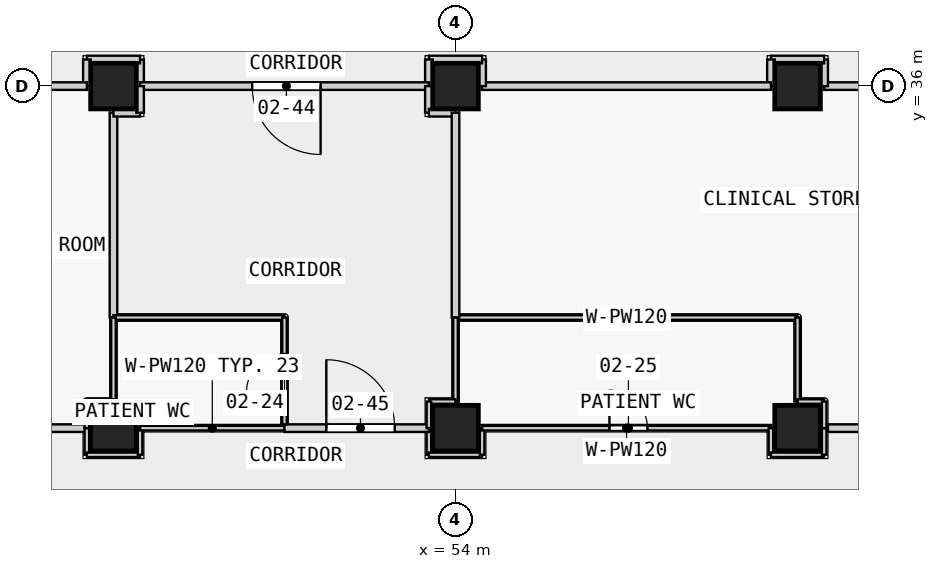
"""IFC4 building model, lengths in metres.
Left out: names, types, materials, properties, quantities, classifications, styles, units other than length and angle.
Written with IfcOpenShell. Run it as: python <this file> out.ifc"""

import sys

from ifc_helpers import new_model, si_unit, direction, frame, frame_2d, origin, origin_2d, place, context, subcontext, project, spatial, rectangle, extrude, element, fill, save


model = new_model("IFC4")
c1 = context("Model", 3, precision=1e-05, world=origin(), true_north=direction((0.0, 1.0)))
c2 = subcontext(c1, "Body", "Model", "MODEL_VIEW")
j1 = project(units=[si_unit("LENGTHUNIT", "METRE"), si_unit("PLANEANGLEUNIT", "RADIAN")], contexts=[c1])
p1 = place(None, origin())
s1 = spatial("IfcSite", under=j1, at=p1, CompositionType="ELEMENT")
p2 = place(p1, origin())
s2 = spatial("IfcBuilding", under=s1, at=p2, CompositionType="ELEMENT")
p3 = place(p2, frame((0.0, 0.0, 12.8)))
s3 = spatial("IfcBuildingStorey", under=s2, at=p3, CompositionType="ELEMENT", Elevation=12.8)
for number, where, z_axis, x_axis in (
    (1, (45.0, 27.0, 0.0), (0.0, 0.0, 1.0), (1.0, 0.0, 0.0)),
    (2, (45.0, 36.0, 0.0), (0.0, 0.0, 1.0), (1.0, 0.0, 0.0)),
    (3, (54.0, 27.0, 0.0), (0.0, 0.0, 1.0), (1.0, 0.0, 0.0)),
    (4, (54.0, 36.0, 0.0), (0.0, 0.0, 1.0), (1.0, 0.0, 0.0)),
    (5, (63.0, 27.0, 0.0), (0.0, 0.0, 1.0), (1.0, 0.0, 0.0)),
    (6, (63.0, 36.0, 0.0), (0.0, 0.0, 1.0), (1.0, 0.0, 0.0)),
):
    element("IfcColumn", number, at=place(p3, frame(where, z_axis=z_axis, x_axis=x_axis)), inside=s3, PredefinedType="COLUMN", context=c2, shape_type="SweptSolid", body=[
        extrude(rectangle(XDim=1.2, YDim=1.2, at=origin_2d()), origin(), (0.0, 0.0, 1.0), 4.5),
    ])
p4 = place(p3, frame((71.3, 36.0, 0.0), z_axis=(0.0, 0.0, 1.0), x_axis=(-1.0, 0.0, 0.0)))
e7 = element("IfcWall", 7, at=p4, inside=s3, PredefinedType="PARTITIONING", context=c2, shape_type="SweptSolid", body=[
    extrude(rectangle(XDim=7.6, YDim=0.2, at=frame_2d((3.8, 0.0))), origin(), (0.0, 0.0, 1.0), 3.45),
])
p5 = place(p4, frame((3.35, 0.0, 0.0)))
e8 = element("IfcOpeningElement", 8, at=p5, cuts=e7, PredefinedType="OPENING", context=c2, shape_type="SweptSolid", body=[
    extrude(rectangle(XDim=0.9, YDim=2.1, at=frame_2d((0.45, 1.05))), frame((0.0, 0.11, 0.0), z_axis=(0.0, -1.0, 0.0), x_axis=(1.0, 0.0, 0.0)), (0.0, 0.0, 1.0), 0.22),
])
p6 = place(p3, frame((63.7, 36.0, 0.0), z_axis=(0.0, 0.0, 1.0), x_axis=(0.0, 1.0, 0.0)))
e9 = element("IfcWall", 9, at=p6, inside=s3, PredefinedType="PARTITIONING", context=c2, shape_type="SweptSolid", body=[
    extrude(rectangle(XDim=0.7, YDim=0.2, at=frame_2d((0.35, 0.0))), origin(), (0.0, 0.0, 1.0), 3.45),
])
p7 = place(p3, frame((63.7, 36.7, 0.0), z_axis=(0.0, 0.0, 1.0), x_axis=(-1.0, 0.0, 0.0)))
e10 = element("IfcWall", 10, at=p7, inside=s3, PredefinedType="PARTITIONING", context=c2, shape_type="SweptSolid", body=[
    extrude(rectangle(XDim=1.4, YDim=0.2, at=frame_2d((0.7, 0.0))), origin(), (0.0, 0.0, 1.0), 3.45),
])
p8 = place(p3, frame((62.3, 36.7, 0.0), z_axis=(0.0, 0.0, 1.0), x_axis=(0.0, -1.0, 0.0)))
e11 = element("IfcWall", 11, at=p8, inside=s3, PredefinedType="PARTITIONING", context=c2, shape_type="SweptSolid", body=[
    extrude(rectangle(XDim=0.7, YDim=0.2, at=frame_2d((0.35, 0.0))), origin(), (0.0, 0.0, 1.0), 3.45),
])
p9 = place(p3, frame((62.3, 36.0, 0.0), z_axis=(0.0, 0.0, 1.0), x_axis=(-1.0, 0.0, 0.0)))
e12 = element("IfcWall", 12, at=p9, inside=s3, PredefinedType="PARTITIONING", context=c2, shape_type="SweptSolid", body=[
    extrude(rectangle(XDim=7.6, YDim=0.2, at=frame_2d((3.8, 0.0))), origin(), (0.0, 0.0, 1.0), 3.45),
])
p10 = place(p3, frame((54.7, 36.0, 0.0), z_axis=(0.0, 0.0, 1.0), x_axis=(0.0, 1.0, 0.0)))
e13 = element("IfcWall", 13, at=p10, inside=s3, PredefinedType="PARTITIONING", context=c2, shape_type="SweptSolid", body=[
    extrude(rectangle(XDim=0.7, YDim=0.2, at=frame_2d((0.35, 0.0))), origin(), (0.0, 0.0, 1.0), 3.45),
])
p11 = place(p3, frame((54.7, 36.7, 0.0), z_axis=(0.0, 0.0, 1.0), x_axis=(-1.0, 0.0, 0.0)))
e14 = element("IfcWall", 14, at=p11, inside=s3, PredefinedType="PARTITIONING", context=c2, shape_type="SweptSolid", body=[
    extrude(rectangle(XDim=1.4, YDim=0.2, at=frame_2d((0.7, 0.0))), origin(), (0.0, 0.0, 1.0), 3.45),
])
p12 = place(p3, frame((53.3, 36.7, 0.0), z_axis=(0.0, 0.0, 1.0), x_axis=(0.0, -1.0, 0.0)))
e15 = element("IfcWall", 15, at=p12, inside=s3, PredefinedType="PARTITIONING", context=c2, shape_type="SweptSolid", body=[
    extrude(rectangle(XDim=0.7, YDim=0.2, at=frame_2d((0.35, 0.0))), origin(), (0.0, 0.0, 1.0), 3.45),
])
p13 = place(p3, frame((53.3, 27.0, 0.0), z_axis=(0.0, 0.0, 1.0), x_axis=(0.0, -1.0, 0.0)))
e16 = element("IfcWall", 16, at=p13, inside=s3, PredefinedType="PARTITIONING", context=c2, shape_type="SweptSolid", body=[
    extrude(rectangle(XDim=0.7, YDim=0.12, at=frame_2d((0.35, 0.0))), origin(), (0.0, 0.0, 1.0), 3.45),
])
p14 = place(p3, frame((53.3, 26.3, 0.0), z_axis=(0.0, 0.0, 1.0), x_axis=(1.0, 0.0, 0.0)))
e17 = element("IfcWall", 17, at=p14, inside=s3, PredefinedType="PARTITIONING", context=c2, shape_type="SweptSolid", body=[
    extrude(rectangle(XDim=1.4, YDim=0.12, at=frame_2d((0.7, 0.0))), origin(), (0.0, 0.0, 1.0), 3.45),
])
p15 = place(p3, frame((54.7, 26.3, 0.0), z_axis=(0.0, 0.0, 1.0), x_axis=(0.0, 1.0, 0.0)))
e18 = element("IfcWall", 18, at=p15, inside=s3, PredefinedType="PARTITIONING", context=c2, shape_type="SweptSolid", body=[
    extrude(rectangle(XDim=0.7, YDim=0.12, at=frame_2d((0.35, 0.0))), origin(), (0.0, 0.0, 1.0), 3.45),
])
p16 = place(p3, frame((54.7, 27.0, 0.0), z_axis=(0.0, 0.0, 1.0), x_axis=(1.0, 0.0, 0.0)))
e19 = element("IfcWall", 19, at=p16, inside=s3, PredefinedType="PARTITIONING", context=c2, shape_type="SweptSolid", body=[
    extrude(rectangle(XDim=7.6, YDim=0.12, at=frame_2d((3.8, 0.0))), origin(), (0.0, 0.0, 1.0), 3.45),
])
p17 = place(p16, frame((3.35, 0.0, 0.0)))
e20 = element("IfcOpeningElement", 20, at=p17, cuts=e19, PredefinedType="OPENING", context=c2, shape_type="SweptSolid", body=[
    extrude(rectangle(XDim=1.0, YDim=2.1, at=frame_2d((0.5, 1.05))), frame((0.0, 0.07, 0.0), z_axis=(0.0, -1.0, 0.0), x_axis=(1.0, 0.0, 0.0)), (0.0, 0.0, 1.0), 0.14),
])
p18 = place(p3, frame((62.3, 27.0, 0.0), z_axis=(0.0, 0.0, 1.0), x_axis=(0.0, -1.0, 0.0)))
e21 = element("IfcWall", 21, at=p18, inside=s3, PredefinedType="PARTITIONING", context=c2, shape_type="SweptSolid", body=[
    extrude(rectangle(XDim=0.7, YDim=0.12, at=frame_2d((0.35, 0.0))), origin(), (0.0, 0.0, 1.0), 3.45),
])
p19 = place(p3, frame((62.3, 26.3, 0.0), z_axis=(0.0, 0.0, 1.0), x_axis=(1.0, 0.0, 0.0)))
e22 = element("IfcWall", 22, at=p19, inside=s3, PredefinedType="PARTITIONING", context=c2, shape_type="SweptSolid", body=[
    extrude(rectangle(XDim=1.4, YDim=0.12, at=frame_2d((0.7, 0.0))), origin(), (0.0, 0.0, 1.0), 3.45),
])
p20 = place(p3, frame((63.7, 26.3, 0.0), z_axis=(0.0, 0.0, 1.0), x_axis=(0.0, 1.0, 0.0)))
e23 = element("IfcWall", 23, at=p20, inside=s3, PredefinedType="PARTITIONING", context=c2, shape_type="SweptSolid", body=[
    extrude(rectangle(XDim=0.7, YDim=0.12, at=frame_2d((0.35, 0.0))), origin(), (0.0, 0.0, 1.0), 3.45),
])
p21 = place(p3, frame((54.0, 29.911, 0.0), z_axis=(0.0, 0.0, 1.0), x_axis=(1.0, 0.0, 0.0)))
e24 = element("IfcWall", 24, at=p21, inside=s3, PredefinedType="PARTITIONING", context=c2, shape_type="SweptSolid", body=[
    extrude(rectangle(XDim=9.0, YDim=0.12, at=frame_2d((4.5, 0.0))), origin(), (0.0, 0.0, 1.0), 3.45),
])
p22 = place(p3, frame((63.0, 29.911, 0.0), z_axis=(0.0, 0.0, 1.0), x_axis=(0.0, -1.0, 0.0)))
e25 = element("IfcWall", 25, at=p22, inside=s3, PredefinedType="PARTITIONING", context=c2, shape_type="SweptSolid", body=[
    extrude(rectangle(XDim=2.211, YDim=0.12, at=frame_2d((1.105, 0.0))), origin(), (0.0, 0.0, 1.0), 3.45),
])
for number, where, z_axis, x_axis in (
    (26, (63.0, 27.7, 0.0), (0.0, 0.0, 1.0), (1.0, 0.0, 0.0)),
    (27, (63.7, 27.7, 0.0), (0.0, 0.0, 1.0), (0.0, -1.0, 0.0)),
):
    element("IfcWall", number, at=place(p3, frame(where, z_axis=z_axis, x_axis=x_axis)), inside=s3, PredefinedType="PARTITIONING", context=c2, shape_type="SweptSolid", body=[
        extrude(rectangle(XDim=0.7, YDim=0.12, at=frame_2d((0.35, 0.0))), origin(), (0.0, 0.0, 1.0), 3.45),
    ])
p23 = place(p3, frame((45.7, 36.0, 0.0), z_axis=(0.0, 0.0, 1.0), x_axis=(0.0, 1.0, 0.0)))
e28 = element("IfcWall", 28, at=p23, inside=s3, PredefinedType="PARTITIONING", context=c2, shape_type="SweptSolid", body=[
    extrude(rectangle(XDim=0.7, YDim=0.2, at=frame_2d((0.35, 0.0))), origin(), (0.0, 0.0, 1.0), 3.45),
])
p24 = place(p3, frame((45.7, 36.7, 0.0), z_axis=(0.0, 0.0, 1.0), x_axis=(-1.0, 0.0, 0.0)))
e29 = element("IfcWall", 29, at=p24, inside=s3, PredefinedType="PARTITIONING", context=c2, shape_type="SweptSolid", body=[
    extrude(rectangle(XDim=1.4, YDim=0.2, at=frame_2d((0.7, 0.0))), origin(), (0.0, 0.0, 1.0), 3.45),
])
p25 = place(p3, frame((44.3, 36.7, 0.0), z_axis=(0.0, 0.0, 1.0), x_axis=(0.0, -1.0, 0.0)))
e30 = element("IfcWall", 30, at=p25, inside=s3, PredefinedType="PARTITIONING", context=c2, shape_type="SweptSolid", body=[
    extrude(rectangle(XDim=0.7, YDim=0.2, at=frame_2d((0.35, 0.0))), origin(), (0.0, 0.0, 1.0), 3.45),
])
p26 = place(p3, frame((44.3, 36.0, 0.0), z_axis=(0.0, 0.0, 1.0), x_axis=(-1.0, 0.0, 0.0)))
e31 = element("IfcWall", 31, at=p26, inside=s3, PredefinedType="PARTITIONING", context=c2, shape_type="SweptSolid", body=[
    extrude(rectangle(XDim=7.6, YDim=0.2, at=frame_2d((3.8, 0.0))), origin(), (0.0, 0.0, 1.0), 3.45),
])
p27 = place(p26, frame((3.1, 0.0, 0.0)))
e32 = element("IfcOpeningElement", 32, at=p27, cuts=e31, PredefinedType="OPENING", context=c2, shape_type="SweptSolid", body=[
    extrude(rectangle(XDim=1.4, YDim=2.1, at=frame_2d((0.7, 1.05))), frame((0.0, 0.11, 0.0), z_axis=(0.0, -1.0, 0.0), x_axis=(1.0, 0.0, 0.0)), (0.0, 0.0, 1.0), 0.22),
])
p28 = place(p3, frame((53.3, 36.0, 0.0), z_axis=(0.0, 0.0, 1.0), x_axis=(-1.0, 0.0, 0.0)))
e33 = element("IfcWall", 33, at=p28, inside=s3, PredefinedType="PARTITIONING", context=c2, shape_type="SweptSolid", body=[
    extrude(rectangle(XDim=7.6, YDim=0.2, at=frame_2d((3.8, 0.0))), origin(), (0.0, 0.0, 1.0), 3.45),
])
p29 = place(p28, frame((2.85, 0.0, 0.0)))
e34 = element("IfcOpeningElement", 34, at=p29, cuts=e33, PredefinedType="OPENING", context=c2, shape_type="SweptSolid", body=[
    extrude(rectangle(XDim=1.8, YDim=2.1, at=frame_2d((0.9, 1.05))), frame((0.0, 0.11, 0.0), z_axis=(0.0, -1.0, 0.0), x_axis=(1.0, 0.0, 0.0)), (0.0, 0.0, 1.0), 0.22),
])
p30 = place(p3, frame((63.8, 27.0, 0.0), z_axis=(0.0, 0.0, 1.0), x_axis=(1.0, 0.0, 0.0)))
e35 = element("IfcWall", 35, at=p30, inside=s3, PredefinedType="PARTITIONING", context=c2, shape_type="SweptSolid", body=[
    extrude(rectangle(XDim=7.4, YDim=0.2, at=frame_2d((3.7, 0.0))), origin(), (0.0, 0.0, 1.0), 3.45),
])
p31 = place(p3, frame((36.7, 27.0, 0.0), z_axis=(0.0, 0.0, 1.0), x_axis=(1.0, 0.0, 0.0)))
e36 = element("IfcWall", 36, at=p31, inside=s3, PredefinedType="PARTITIONING", context=c2, shape_type="SweptSolid", body=[
    extrude(rectangle(XDim=7.6, YDim=0.2, at=frame_2d((3.8, 0.0))), origin(), (0.0, 0.0, 1.0), 3.45),
])
p32 = place(p3, frame((45.0, 29.911, 0.0), z_axis=(0.0, 0.0, 1.0), x_axis=(0.0, 1.0, 0.0)))
e37 = element("IfcWall", 37, at=p32, inside=s3, PredefinedType="PARTITIONING", context=c2, shape_type="SweptSolid", body=[
    extrude(rectangle(XDim=5.389, YDim=0.2, at=frame_2d((2.695, 0.0))), origin(), (0.0, 0.0, 1.0), 3.45),
])
for number, where, z_axis, x_axis in (
    (38, (45.0, 35.3, 0.0), (0.0, 0.0, 1.0), (1.0, 0.0, 0.0)),
    (39, (45.7, 35.3, 0.0), (0.0, 0.0, 1.0), (0.0, 1.0, 0.0)),
    (40, (53.3, 36.0, 0.0), (0.0, 0.0, 1.0), (0.0, -1.0, 0.0)),
    (41, (53.3, 35.3, 0.0), (0.0, 0.0, 1.0), (1.0, 0.0, 0.0)),
):
    element("IfcWall", number, at=place(p3, frame(where, z_axis=z_axis, x_axis=x_axis)), inside=s3, PredefinedType="PARTITIONING", context=c2, shape_type="SweptSolid", body=[
        extrude(rectangle(XDim=0.7, YDim=0.2, at=frame_2d((0.35, 0.0))), origin(), (0.0, 0.0, 1.0), 3.45),
    ])
p33 = place(p3, frame((54.0, 35.3, 0.0), z_axis=(0.0, 0.0, 1.0), x_axis=(0.0, -1.0, 0.0)))
e42 = element("IfcWall", 42, at=p33, inside=s3, PredefinedType="PARTITIONING", context=c2, shape_type="SweptSolid", body=[
    extrude(rectangle(XDim=5.389, YDim=0.2, at=frame_2d((2.695, 0.0))), origin(), (0.0, 0.0, 1.0), 3.45),
])
p34 = place(p3, frame((44.3, 27.0, 0.0), z_axis=(0.0, 0.0, 1.0), x_axis=(0.0, -1.0, 0.0)))
e43 = element("IfcWall", 43, at=p34, inside=s3, PredefinedType="PARTITIONING", context=c2, shape_type="SweptSolid", body=[
    extrude(rectangle(XDim=0.7, YDim=0.12, at=frame_2d((0.35, 0.0))), origin(), (0.0, 0.0, 1.0), 3.45),
])
p35 = place(p3, frame((44.3, 26.3, 0.0), z_axis=(0.0, 0.0, 1.0), x_axis=(1.0, 0.0, 0.0)))
e44 = element("IfcWall", 44, at=p35, inside=s3, PredefinedType="PARTITIONING", context=c2, shape_type="SweptSolid", body=[
    extrude(rectangle(XDim=1.4, YDim=0.12, at=frame_2d((0.7, 0.0))), origin(), (0.0, 0.0, 1.0), 3.45),
])
p36 = place(p3, frame((45.7, 26.3, 0.0), z_axis=(0.0, 0.0, 1.0), x_axis=(0.0, 1.0, 0.0)))
e45 = element("IfcWall", 45, at=p36, inside=s3, PredefinedType="PARTITIONING", context=c2, shape_type="SweptSolid", body=[
    extrude(rectangle(XDim=0.7, YDim=0.12, at=frame_2d((0.35, 0.0))), origin(), (0.0, 0.0, 1.0), 3.45),
])
p37 = place(p3, frame((45.7, 27.0, 0.0), z_axis=(0.0, 0.0, 1.0), x_axis=(1.0, 0.0, 0.0)))
e46 = element("IfcWall", 46, at=p37, inside=s3, PredefinedType="PARTITIONING", context=c2, shape_type="SweptSolid", body=[
    extrude(rectangle(XDim=3.8, YDim=0.12, at=frame_2d((1.9, 0.0))), origin(), (0.0, 0.0, 1.0), 3.45),
])
p38 = place(p3, frame((49.5, 29.911, 0.0), z_axis=(0.0, 0.0, 1.0), x_axis=(-1.0, 0.0, 0.0)))
e47 = element("IfcWall", 47, at=p38, inside=s3, PredefinedType="PARTITIONING", context=c2, shape_type="SweptSolid", body=[
    extrude(rectangle(XDim=4.5, YDim=0.12, at=frame_2d((2.25, 0.0))), origin(), (0.0, 0.0, 1.0), 3.45),
])
p39 = place(p3, frame((49.5, 27.0, 0.0), z_axis=(0.0, 0.0, 1.0), x_axis=(1.0, 0.0, 0.0)))
e48 = element("IfcWall", 48, at=p39, inside=s3, PredefinedType="PARTITIONING", context=c2, shape_type="SweptSolid", body=[
    extrude(rectangle(XDim=3.8, YDim=0.2, at=frame_2d((1.9, 0.0))), origin(), (0.0, 0.0, 1.0), 3.45),
])
p40 = place(p39, frame((1.1, 0.0, 0.0)))
e49 = element("IfcOpeningElement", 49, at=p40, cuts=e48, PredefinedType="OPENING", context=c2, shape_type="SweptSolid", body=[
    extrude(rectangle(XDim=1.8, YDim=2.1, at=frame_2d((0.9, 1.05))), frame((0.0, 0.11, 0.0), z_axis=(0.0, -1.0, 0.0), x_axis=(1.0, 0.0, 0.0)), (0.0, 0.0, 1.0), 0.22),
])
p41 = place(p3, frame((54.0, 29.911, 0.0), z_axis=(0.0, 0.0, 1.0), x_axis=(0.0, -1.0, 0.0)))
e50 = element("IfcWall", 50, at=p41, inside=s3, PredefinedType="PARTITIONING", context=c2, shape_type="SweptSolid", body=[
    extrude(rectangle(XDim=2.211, YDim=0.12, at=frame_2d((1.105, 0.0))), origin(), (0.0, 0.0, 1.0), 3.45),
])
for number, where, z_axis, x_axis in (
    (51, (54.0, 27.7, 0.0), (0.0, 0.0, 1.0), (-1.0, 0.0, 0.0)),
    (52, (53.3, 27.7, 0.0), (0.0, 0.0, 1.0), (0.0, -1.0, 0.0)),
):
    element("IfcWall", number, at=place(p3, frame(where, z_axis=z_axis, x_axis=x_axis)), inside=s3, PredefinedType="PARTITIONING", context=c2, shape_type="SweptSolid", body=[
        extrude(rectangle(XDim=0.7, YDim=0.12, at=frame_2d((0.35, 0.0))), origin(), (0.0, 0.0, 1.0), 3.45),
    ])
p42 = place(p3, frame((45.0, 29.911, 0.0), z_axis=(0.0, 0.0, 1.0), x_axis=(0.0, -1.0, 0.0)))
e53 = element("IfcWall", 53, at=p42, inside=s3, PredefinedType="PARTITIONING", context=c2, shape_type="SweptSolid", body=[
    extrude(rectangle(XDim=2.211, YDim=0.12, at=frame_2d((1.105, 0.0))), origin(), (0.0, 0.0, 1.0), 3.45),
])
for number, where, z_axis, x_axis in (
    (54, (45.0, 27.7, 0.0), (0.0, 0.0, 1.0), (-1.0, 0.0, 0.0)),
    (55, (44.3, 27.7, 0.0), (0.0, 0.0, 1.0), (0.0, -1.0, 0.0)),
):
    element("IfcWall", number, at=place(p3, frame(where, z_axis=z_axis, x_axis=x_axis)), inside=s3, PredefinedType="PARTITIONING", context=c2, shape_type="SweptSolid", body=[
        extrude(rectangle(XDim=0.7, YDim=0.12, at=frame_2d((0.35, 0.0))), origin(), (0.0, 0.0, 1.0), 3.45),
    ])
p43 = place(p3, frame((49.5, 27.1, 0.0), z_axis=(0.0, 0.0, 1.0), x_axis=(0.0, 1.0, 0.0)))
e56 = element("IfcWall", 56, at=p43, inside=s3, PredefinedType="PARTITIONING", context=c2, shape_type="SweptSolid", body=[
    extrude(rectangle(XDim=2.811, YDim=0.12, at=frame_2d((1.405, 0.0))), origin(), (0.0, 0.0, 1.0), 3.45),
])
p44 = place(p43, frame((0.85, 0.0, 0.0)))
e57 = element("IfcOpeningElement", 57, at=p44, cuts=e56, PredefinedType="OPENING", context=c2, shape_type="SweptSolid", body=[
    extrude(rectangle(XDim=1.0, YDim=2.1, at=frame_2d((0.5, 1.05))), frame((0.0, 0.07, 0.0), z_axis=(0.0, -1.0, 0.0), x_axis=(1.0, 0.0, 0.0)), (0.0, 0.0, 1.0), 0.14),
])
p45 = place(p44, origin())
e58 = element("IfcDoor", 58, at=p45, inside=s3, OperationType="SINGLE_SWING_LEFT", PredefinedType="DOOR", context=c2, shape_type="SweptSolid", body=[
    extrude(rectangle(XDim=1.0, YDim=2.1, at=frame_2d((0.5, 1.05))), frame((0.0, 0.025, 0.0), z_axis=(0.0, -1.0, 0.0), x_axis=(1.0, 0.0, 0.0)), (0.0, 0.0, 1.0), 0.05),
])
fill(e57, e58)
p46 = place(p17, origin())
e59 = element("IfcDoor", 59, at=p46, inside=s3, OperationType="SINGLE_SWING_LEFT", PredefinedType="DOOR", context=c2, shape_type="SweptSolid", body=[
    extrude(rectangle(XDim=1.0, YDim=2.1, at=frame_2d((0.5, 1.05))), frame((0.0, 0.025, 0.0), z_axis=(0.0, -1.0, 0.0), x_axis=(1.0, 0.0, 0.0)), (0.0, 0.0, 1.0), 0.05),
])
fill(e20, e59)
p47 = place(p29, origin())
e60 = element("IfcDoor", 60, at=p47, inside=s3, OperationType="DOUBLE_DOOR_SINGLE_SWING", PredefinedType="DOOR", context=c2, shape_type="SweptSolid", body=[
    extrude(rectangle(XDim=1.8, YDim=2.1, at=frame_2d((0.9, 1.05))), frame((0.0, 0.025, 0.0), z_axis=(0.0, -1.0, 0.0), x_axis=(1.0, 0.0, 0.0)), (0.0, 0.0, 1.0), 0.05),
])
fill(e34, e60)
p48 = place(p40, origin())
e61 = element("IfcDoor", 61, at=p48, inside=s3, OperationType="DOUBLE_DOOR_SINGLE_SWING", PredefinedType="DOOR", context=c2, shape_type="SweptSolid", body=[
    extrude(rectangle(XDim=1.8, YDim=2.1, at=frame_2d((0.9, 1.05))), frame((0.0, 0.025, 0.0), z_axis=(0.0, -1.0, 0.0), x_axis=(1.0, 0.0, 0.0)), (0.0, 0.0, 1.0), 0.05),
])
fill(e49, e61)
save(model, sys.argv[1])
